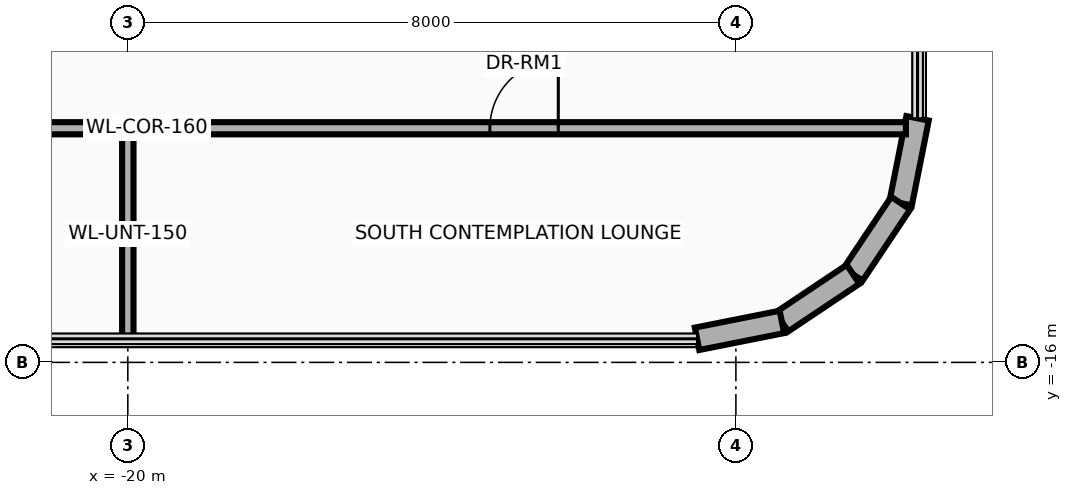
"""IFC4 building model, lengths in metres.
Left out: names, types, materials, properties, quantities, classifications, styles, units other than length and angle.
Written with IfcOpenShell. Run it as: python <this file> out.ifc"""

import sys

from ifc_helpers import new_model, si_unit, direction, frame, frame_2d, origin, place, context, subcontext, project, spatial, rectangle, extrude, element, fill, save


model = new_model("IFC4")
c1 = context("Model", 3, precision=1e-05, world=origin(), true_north=direction((0.0, 1.0)))
c2 = subcontext(c1, "Body", "Model", "MODEL_VIEW")
j1 = project(units=[si_unit("LENGTHUNIT", "METRE"), si_unit("PLANEANGLEUNIT", "RADIAN")], contexts=[c1])
p1 = place(None, origin())
s1 = spatial("IfcSite", under=j1, at=p1, CompositionType="ELEMENT")
p2 = place(p1, origin())
s2 = spatial("IfcBuilding", under=s1, at=p2, CompositionType="ELEMENT")
p3 = place(p2, frame((0.0, 0.0, 290.6)))
s3 = spatial("IfcBuildingStorey", under=s2, at=p3, CompositionType="ELEMENT", Elevation=290.6)
p4 = place(p3, frame((-9.61, -12.789, 0.0), z_axis=(0.0, 0.0, 1.0), x_axis=(-0.195043173023, -0.980794657743, 0.0)))
e1 = element("IfcWall", 1, at=p4, inside=s3, PredefinedType="SOLIDWALL", context=c2, shape_type="SweptSolid", body=[
    extrude(rectangle(XDim=1.138, YDim=0.3, at=frame_2d((0.569, 0.0))), origin(), (0.0, 0.0, 1.0), 3.36),
])
for number, where, z_axis, x_axis in (
    (2, (-9.832, -13.905, 0.0), (0.0, 0.0, 1.0), (-0.556, -0.831, 0.0)),
    (3, (-10.458, -14.842, 0.0), (0.0, 0.0, 1.0), (-0.831, -0.556, 0.0)),
):
    element("IfcWall", number, at=place(p3, frame(where, z_axis=z_axis, x_axis=x_axis)), inside=s3, PredefinedType="SOLIDWALL", context=c2, shape_type="SweptSolid", body=[
        extrude(rectangle(XDim=1.127, YDim=0.3, at=frame_2d((0.563, 0.0))), origin(), (0.0, 0.0, 1.0), 3.36),
    ])
p5 = place(p3, frame((-11.395, -15.468, 0.0), z_axis=(0.0, 0.0, 1.0), x_axis=(-0.980794657743, -0.195043173023, 0.0)))
e4 = element("IfcWall", 4, at=p5, inside=s3, PredefinedType="SOLIDWALL", context=c2, shape_type="SweptSolid", body=[
    extrude(rectangle(XDim=1.138, YDim=0.3, at=frame_2d((0.569, 0.0))), origin(), (0.0, 0.0, 1.0), 3.36),
])
p6 = place(p3, frame((-29.737, -12.92, 0.0), z_axis=(0.0, 0.0, 1.0), x_axis=(1.0, 0.0, 0.0)))
e5 = element("IfcWall", 5, at=p6, inside=s3, PredefinedType="PARTITIONING", context=c2, shape_type="SweptSolid", body=[
    extrude(rectangle(XDim=19.973, YDim=0.16, at=frame_2d((9.987, 0.0))), origin(), (0.0, 0.0, 1.0), 3.36),
])
p7 = place(p6, frame((5.0, 0.0, 0.0)))
e6 = element("IfcOpeningElement", 6, at=p7, cuts=e5, PredefinedType="OPENING", context=c2, shape_type="SweptSolid", body=[
    extrude(rectangle(XDim=0.9, YDim=2.1, at=frame_2d((0.45, 1.05))), frame((0.0, 0.095, 0.0), z_axis=(0.0, -1.0, 0.0), x_axis=(1.0, 0.0, 0.0)), (0.0, 0.0, 1.0), 0.19),
])
p8 = place(p6, frame((14.5, 0.0, 0.0)))
e7 = element("IfcOpeningElement", 7, at=p8, cuts=e5, PredefinedType="OPENING", context=c2, shape_type="SweptSolid", body=[
    extrude(rectangle(XDim=0.9, YDim=2.1, at=frame_2d((0.45, 1.05))), frame((0.0, 0.095, 0.0), z_axis=(0.0, -1.0, 0.0), x_axis=(1.0, 0.0, 0.0)), (0.0, 0.0, 1.0), 0.19),
])
p9 = place(p3, frame((-20.0, -15.69, 0.0), z_axis=(0.0, 0.0, 1.0), x_axis=(0.0, 1.0, 0.0)))
e8 = element("IfcWall", 8, at=p9, inside=s3, PredefinedType="PARTITIONING", context=c2, shape_type="SweptSolid", body=[
    extrude(rectangle(XDim=2.77, YDim=0.15, at=frame_2d((1.385, 0.0))), origin(), (0.0, 0.0, 1.0), 3.36),
])
p10 = place(p8, origin())
e9 = element("IfcDoor", 9, at=p10, inside=s3, OperationType="SINGLE_SWING_RIGHT", PredefinedType="DOOR", context=c2, shape_type="SweptSolid", body=[
    extrude(rectangle(XDim=0.9, YDim=2.1, at=frame_2d((0.45, 1.05))), frame((0.0, 0.025, 0.0), z_axis=(0.0, -1.0, 0.0), x_axis=(1.0, 0.0, 0.0)), (0.0, 0.0, 1.0), 0.05),
])
fill(e7, e9)
save(model, sys.argv[1])
